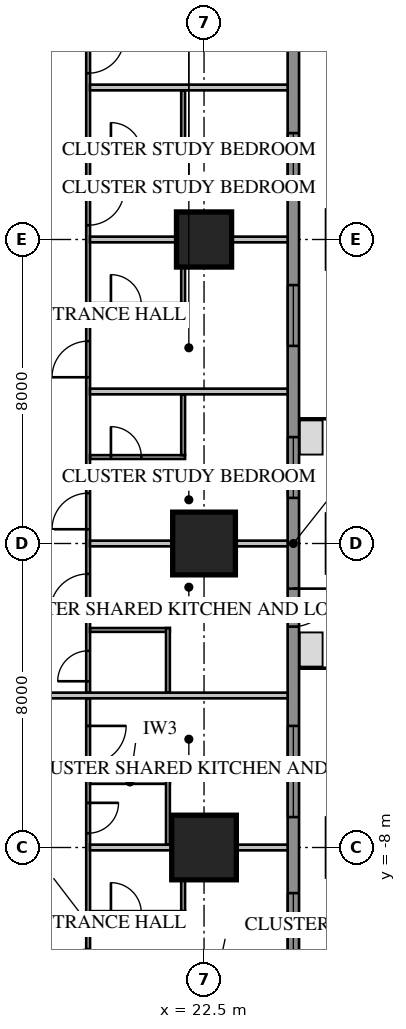
"""IFC4 building model, lengths in metres.
Left out: names, types, materials, properties, quantities, classifications, styles, units other than length and angle.
Written with IfcOpenShell. Run it as: python <this file> out.ifc"""

import sys

from ifc_helpers import new_model, si_unit, direction, frame, frame_2d, origin, origin_2d, place, context, subcontext, project, spatial, rectangle, extrude, element, fill, save


model = new_model("IFC4")
c1 = context("Model", 3, precision=1e-05, world=origin(), true_north=direction((0.0, 1.0)))
c2 = subcontext(c1, "Body", "Model", "MODEL_VIEW")
j1 = project(units=[si_unit("LENGTHUNIT", "METRE"), si_unit("PLANEANGLEUNIT", "RADIAN")], contexts=[c1])
p1 = place(None, origin())
s1 = spatial("IfcSite", under=j1, at=p1, CompositionType="ELEMENT")
p2 = place(p1, origin())
s2 = spatial("IfcBuilding", under=s1, at=p2, CompositionType="ELEMENT")
p3 = place(p2, frame((0.0, 0.0, 42.95)))
s3 = spatial("IfcBuildingStorey", under=s2, at=p3, CompositionType="ELEMENT", Elevation=42.95)
p4 = place(p3, frame((22.5, -8.0, 0.0), z_axis=(0.0, 0.0, 1.0), x_axis=(1.0, 0.0, 0.0)))
e1 = element("IfcColumn", 1, at=p4, inside=s3, PredefinedType="COLUMN", context=c2, shape_type="SweptSolid", body=[
    extrude(rectangle(XDim=1.7, YDim=1.7, at=origin_2d()), origin(), (0.0, 0.0, 1.0), 3.85),
])
p5 = place(p3, frame((22.5, 0.0, 0.0), z_axis=(0.0, 0.0, 1.0), x_axis=(1.0, 0.0, 0.0)))
e2 = element("IfcColumn", 2, at=p5, inside=s3, PredefinedType="COLUMN", context=c2, shape_type="SweptSolid", body=[
    extrude(rectangle(XDim=1.65, YDim=1.65, at=origin_2d()), origin(), (0.0, 0.0, 1.0), 3.85),
])
p6 = place(p3, frame((22.5, 8.0, 0.0), z_axis=(0.0, 0.0, 1.0), x_axis=(1.0, 0.0, 0.0)))
e3 = element("IfcColumn", 3, at=p6, inside=s3, PredefinedType="COLUMN", context=c2, shape_type="SweptSolid", body=[
    extrude(rectangle(XDim=1.45, YDim=1.45, at=origin_2d()), origin(), (0.0, 0.0, 1.0), 3.85),
])
p7 = place(p3, frame((24.85, -16.0, 0.0), z_axis=(0.0, 0.0, 1.0), x_axis=(0.0, 1.0, 0.0)))
e4 = element("IfcWall", 4, at=p7, inside=s3, PredefinedType="SOLIDWALL", context=c2, shape_type="SweptSolid", body=[
    extrude(rectangle(XDim=32.0, YDim=0.3, at=frame_2d((16.0, 0.0))), origin(), (0.0, 0.0, 1.0), 3.65),
])
p8 = place(p7, frame((1.2, 0.0, 0.75)))
e5 = element("IfcOpeningElement", 5, at=p8, cuts=e4, PredefinedType="OPENING", context=c2, shape_type="SweptSolid", body=[
    extrude(rectangle(XDim=1.6, YDim=1.8, at=frame_2d((0.8, 0.9))), frame((0.0, 0.17, 0.0), z_axis=(0.0, -1.0, 0.0), x_axis=(1.0, 0.0, 0.0)), (0.0, 0.0, 1.0), 0.34),
])
p9 = place(p7, frame((5.2, 0.0, 0.75)))
e6 = element("IfcOpeningElement", 6, at=p9, cuts=e4, PredefinedType="OPENING", context=c2, shape_type="SweptSolid", body=[
    extrude(rectangle(XDim=1.6, YDim=1.8, at=frame_2d((0.8, 0.9))), frame((0.0, 0.17, 0.0), z_axis=(0.0, -1.0, 0.0), x_axis=(1.0, 0.0, 0.0)), (0.0, 0.0, 1.0), 0.34),
])
p10 = place(p7, frame((17.2, 0.0, 0.75)))
e7 = element("IfcOpeningElement", 7, at=p10, cuts=e4, PredefinedType="OPENING", context=c2, shape_type="SweptSolid", body=[
    extrude(rectangle(XDim=1.6, YDim=1.8, at=frame_2d((0.8, 0.9))), frame((0.0, 0.17, 0.0), z_axis=(0.0, -1.0, 0.0), x_axis=(1.0, 0.0, 0.0)), (0.0, 0.0, 1.0), 0.34),
])
p11 = place(p7, frame((21.2, 0.0, 0.75)))
e8 = element("IfcOpeningElement", 8, at=p11, cuts=e4, PredefinedType="OPENING", context=c2, shape_type="SweptSolid", body=[
    extrude(rectangle(XDim=1.6, YDim=1.8, at=frame_2d((0.8, 0.9))), frame((0.0, 0.17, 0.0), z_axis=(0.0, -1.0, 0.0), x_axis=(1.0, 0.0, 0.0)), (0.0, 0.0, 1.0), 0.34),
])
p12 = place(p7, frame((25.2, 0.0, 0.75)))
e9 = element("IfcOpeningElement", 9, at=p12, cuts=e4, PredefinedType="OPENING", context=c2, shape_type="SweptSolid", body=[
    extrude(rectangle(XDim=1.6, YDim=1.8, at=frame_2d((0.8, 0.9))), frame((0.0, 0.17, 0.0), z_axis=(0.0, -1.0, 0.0), x_axis=(1.0, 0.0, 0.0)), (0.0, 0.0, 1.0), 0.34),
])
p13 = place(p7, frame((29.2, 0.0, 0.75)))
e10 = element("IfcOpeningElement", 10, at=p13, cuts=e4, PredefinedType="OPENING", context=c2, shape_type="SweptSolid", body=[
    extrude(rectangle(XDim=1.6, YDim=1.8, at=frame_2d((0.8, 0.9))), frame((0.0, 0.17, 0.0), z_axis=(0.0, -1.0, 0.0), x_axis=(1.0, 0.0, 0.0)), (0.0, 0.0, 1.0), 0.34),
])
p14 = place(p7, frame((8.8, 0.0, 0.75)))
e11 = element("IfcOpeningElement", 11, at=p14, cuts=e4, PredefinedType="OPENING", context=c2, shape_type="SweptSolid", body=[
    extrude(rectangle(XDim=2.4, YDim=1.8, at=frame_2d((1.2, 0.9))), frame((0.0, 0.17, 0.0), z_axis=(0.0, -1.0, 0.0), x_axis=(1.0, 0.0, 0.0)), (0.0, 0.0, 1.0), 0.34),
])
p15 = place(p7, frame((13.812, 0.0, 0.0)))
e12 = element("IfcOpeningElement", 12, at=p15, cuts=e4, PredefinedType="OPENING", context=c2, shape_type="SweptSolid", body=[
    extrude(rectangle(XDim=1.0, YDim=2.4, at=frame_2d((0.5, 1.2))), frame((0.0, 0.17, 0.0), z_axis=(0.0, -1.0, 0.0), x_axis=(1.0, 0.0, 0.0)), (0.0, 0.0, 1.0), 0.34),
])
p16 = place(p3, frame((19.45, -15.925, 0.0), z_axis=(0.0, 0.0, 1.0), x_axis=(0.0, 1.0, 0.0)))
e13 = element("IfcWall", 13, at=p16, inside=s3, PredefinedType="PARTITIONING", context=c2, shape_type="SweptSolid", body=[
    extrude(rectangle(XDim=11.85, YDim=0.1, at=frame_2d((5.925, 0.0))), origin(), (0.0, 0.0, 1.0), 3.65),
])
p17 = place(p16, frame((10.125, 0.0, 0.0)))
e14 = element("IfcOpeningElement", 14, at=p17, cuts=e13, PredefinedType="OPENING", context=c2, shape_type="SweptSolid", body=[
    extrude(rectangle(XDim=1.0, YDim=2.1, at=frame_2d((0.5, 1.05))), frame((0.0, 0.07, 0.0), z_axis=(0.0, -1.0, 0.0), x_axis=(1.0, 0.0, 0.0)), (0.0, 0.0, 1.0), 0.14),
])
p18 = place(p16, frame((8.3, 0.0, 0.0)))
e15 = element("IfcOpeningElement", 15, at=p18, cuts=e13, PredefinedType="OPENING", context=c2, shape_type="SweptSolid", body=[
    extrude(rectangle(XDim=0.8, YDim=2.1, at=frame_2d((0.4, 1.05))), frame((0.0, 0.07, 0.0), z_axis=(0.0, -1.0, 0.0), x_axis=(1.0, 0.0, 0.0)), (0.0, 0.0, 1.0), 0.14),
])
p19 = place(p16, frame((0.3, 0.0, 0.0)))
e16 = element("IfcOpeningElement", 16, at=p19, cuts=e13, PredefinedType="OPENING", context=c2, shape_type="SweptSolid", body=[
    extrude(rectangle(XDim=0.95, YDim=2.1, at=frame_2d((0.475, 1.05))), frame((0.0, 0.07, 0.0), z_axis=(0.0, -1.0, 0.0), x_axis=(1.0, 0.0, 0.0)), (0.0, 0.0, 1.0), 0.14),
])
p20 = place(p16, frame((4.3, 0.0, 0.0)))
e17 = element("IfcOpeningElement", 17, at=p20, cuts=e13, PredefinedType="OPENING", context=c2, shape_type="SweptSolid", body=[
    extrude(rectangle(XDim=0.95, YDim=2.1, at=frame_2d((0.475, 1.05))), frame((0.0, 0.07, 0.0), z_axis=(0.0, -1.0, 0.0), x_axis=(1.0, 0.0, 0.0)), (0.0, 0.0, 1.0), 0.14),
])
p21 = place(p3, frame((19.5, -6.275, 0.0), z_axis=(0.0, 0.0, 1.0), x_axis=(1.0, 0.0, 0.0)))
e18 = element("IfcWall", 18, at=p21, inside=s3, PredefinedType="PARTITIONING", context=c2, shape_type="SweptSolid", body=[
    extrude(rectangle(XDim=2.1, YDim=0.1, at=frame_2d((1.05, 0.0))), origin(), (0.0, 0.0, 1.0), 3.65),
])
p22 = place(p3, frame((21.55, -7.925, 0.0), z_axis=(0.0, 0.0, 1.0), x_axis=(0.0, 1.0, 0.0)))
e19 = element("IfcWall", 19, at=p22, inside=s3, PredefinedType="PARTITIONING", context=c2, shape_type="SweptSolid", body=[
    extrude(rectangle(XDim=1.7, YDim=0.1, at=frame_2d((0.85, 0.0))), origin(), (0.0, 0.0, 1.0), 3.65),
])
p23 = place(p3, frame((19.45, -3.925, 0.0), z_axis=(0.0, 0.0, 1.0), x_axis=(0.0, 1.0, 0.0)))
e20 = element("IfcWall", 20, at=p23, inside=s3, PredefinedType="PARTITIONING", context=c2, shape_type="SweptSolid", body=[
    extrude(rectangle(XDim=19.85, YDim=0.1, at=frame_2d((9.925, 0.0))), origin(), (0.0, 0.0, 1.0), 3.65),
])
p24 = place(p23, frame((2.125, 0.0, 0.0)))
e21 = element("IfcOpeningElement", 21, at=p24, cuts=e20, PredefinedType="OPENING", context=c2, shape_type="SweptSolid", body=[
    extrude(rectangle(XDim=1.0, YDim=2.1, at=frame_2d((0.5, 1.05))), frame((0.0, 0.07, 0.0), z_axis=(0.0, -1.0, 0.0), x_axis=(1.0, 0.0, 0.0)), (0.0, 0.0, 1.0), 0.14),
])
p25 = place(p23, frame((0.3, 0.0, 0.0)))
e22 = element("IfcOpeningElement", 22, at=p25, cuts=e20, PredefinedType="OPENING", context=c2, shape_type="SweptSolid", body=[
    extrude(rectangle(XDim=0.8, YDim=2.1, at=frame_2d((0.4, 1.05))), frame((0.0, 0.07, 0.0), z_axis=(0.0, -1.0, 0.0), x_axis=(1.0, 0.0, 0.0)), (0.0, 0.0, 1.0), 0.14),
])
p26 = place(p23, frame((4.3, 0.0, 0.0)))
e23 = element("IfcOpeningElement", 23, at=p26, cuts=e20, PredefinedType="OPENING", context=c2, shape_type="SweptSolid", body=[
    extrude(rectangle(XDim=0.95, YDim=2.1, at=frame_2d((0.475, 1.05))), frame((0.0, 0.07, 0.0), z_axis=(0.0, -1.0, 0.0), x_axis=(1.0, 0.0, 0.0)), (0.0, 0.0, 1.0), 0.14),
])
p27 = place(p23, frame((8.3, 0.0, 0.0)))
e24 = element("IfcOpeningElement", 24, at=p27, cuts=e20, PredefinedType="OPENING", context=c2, shape_type="SweptSolid", body=[
    extrude(rectangle(XDim=0.95, YDim=2.1, at=frame_2d((0.475, 1.05))), frame((0.0, 0.07, 0.0), z_axis=(0.0, -1.0, 0.0), x_axis=(1.0, 0.0, 0.0)), (0.0, 0.0, 1.0), 0.14),
])
p28 = place(p23, frame((12.3, 0.0, 0.0)))
e25 = element("IfcOpeningElement", 25, at=p28, cuts=e20, PredefinedType="OPENING", context=c2, shape_type="SweptSolid", body=[
    extrude(rectangle(XDim=0.95, YDim=2.1, at=frame_2d((0.475, 1.05))), frame((0.0, 0.07, 0.0), z_axis=(0.0, -1.0, 0.0), x_axis=(1.0, 0.0, 0.0)), (0.0, 0.0, 1.0), 0.14),
])
p29 = place(p23, frame((16.3, 0.0, 0.0)))
e26 = element("IfcOpeningElement", 26, at=p29, cuts=e20, PredefinedType="OPENING", context=c2, shape_type="SweptSolid", body=[
    extrude(rectangle(XDim=0.95, YDim=2.1, at=frame_2d((0.475, 1.05))), frame((0.0, 0.07, 0.0), z_axis=(0.0, -1.0, 0.0), x_axis=(1.0, 0.0, 0.0)), (0.0, 0.0, 1.0), 0.14),
])
p30 = place(p3, frame((19.5, -2.275, 0.0), z_axis=(0.0, 0.0, 1.0), x_axis=(1.0, 0.0, 0.0)))
e27 = element("IfcWall", 27, at=p30, inside=s3, PredefinedType="PARTITIONING", context=c2, shape_type="SweptSolid", body=[
    extrude(rectangle(XDim=2.1, YDim=0.1, at=frame_2d((1.05, 0.0))), origin(), (0.0, 0.0, 1.0), 3.65),
])
p31 = place(p3, frame((21.55, -3.925, 0.0), z_axis=(0.0, 0.0, 1.0), x_axis=(0.0, 1.0, 0.0)))
e28 = element("IfcWall", 28, at=p31, inside=s3, PredefinedType="PARTITIONING", context=c2, shape_type="SweptSolid", body=[
    extrude(rectangle(XDim=1.7, YDim=0.1, at=frame_2d((0.85, 0.0))), origin(), (0.0, 0.0, 1.0), 3.65),
])
p32 = place(p3, frame((19.5, -8.0, 0.0), z_axis=(0.0, 0.0, 1.0), x_axis=(1.0, 0.0, 0.0)))
e29 = element("IfcWall", 29, at=p32, inside=s3, PredefinedType="PARTITIONING", context=c2, shape_type="SweptSolid", body=[
    extrude(rectangle(XDim=5.2, YDim=0.15, at=frame_2d((2.6, 0.0))), origin(), (0.0, 0.0, 1.0), 3.65),
])
p33 = place(p3, frame((18.1, -4.0, 0.0), z_axis=(0.0, 0.0, 1.0), x_axis=(1.0, 0.0, 0.0)))
e30 = element("IfcWall", 30, at=p33, inside=s3, PredefinedType="PARTITIONING", context=c2, shape_type="SweptSolid", body=[
    extrude(rectangle(XDim=6.6, YDim=0.15, at=frame_2d((3.3, 0.0))), origin(), (0.0, 0.0, 1.0), 3.65),
])
p34 = place(p3, frame((19.5, 0.0, 0.0), z_axis=(0.0, 0.0, 1.0), x_axis=(1.0, 0.0, 0.0)))
e31 = element("IfcWall", 31, at=p34, inside=s3, PredefinedType="PARTITIONING", context=c2, shape_type="SweptSolid", body=[
    extrude(rectangle(XDim=5.2, YDim=0.15, at=frame_2d((2.6, 0.0))), origin(), (0.0, 0.0, 1.0), 2.957),
])
for number, where, z_axis, x_axis in (
    (32, (19.5, 4.0, 0.0), (0.0, 0.0, 1.0), (1.0, 0.0, 0.0)),
    (33, (19.5, 8.0, 0.0), (0.0, 0.0, 1.0), (1.0, 0.0, 0.0)),
    (34, (19.5, 12.0, 0.0), (0.0, 0.0, 1.0), (1.0, 0.0, 0.0)),
):
    element("IfcWall", number, at=place(p3, frame(where, z_axis=z_axis, x_axis=x_axis)), inside=s3, PredefinedType="PARTITIONING", context=c2, shape_type="SweptSolid", body=[
        extrude(rectangle(XDim=5.2, YDim=0.15, at=frame_2d((2.6, 0.0))), origin(), (0.0, 0.0, 1.0), 3.65),
    ])
p35 = place(p3, frame((19.5, -9.725, 0.0), z_axis=(0.0, 0.0, 1.0), x_axis=(1.0, 0.0, 0.0)))
e35 = element("IfcWall", 35, at=p35, inside=s3, PredefinedType="PARTITIONING", context=c2, shape_type="SweptSolid", body=[
    extrude(rectangle(XDim=2.5, YDim=0.1, at=frame_2d((1.25, 0.0))), origin(), (0.0, 0.0, 1.0), 3.65),
])
p36 = place(p35, frame((0.55, 0.0, 0.0)))
e36 = element("IfcOpeningElement", 36, at=p36, cuts=e35, PredefinedType="OPENING", context=c2, shape_type="SweptSolid", body=[
    extrude(rectangle(XDim=0.8, YDim=2.1, at=frame_2d((0.4, 1.05))), frame((0.0, 0.07, 0.0), z_axis=(0.0, -1.0, 0.0), x_axis=(1.0, 0.0, 0.0)), (0.0, 0.0, 1.0), 0.14),
])
p37 = place(p3, frame((21.95, -9.675, 0.0), z_axis=(0.0, 0.0, 1.0), x_axis=(0.0, 1.0, 0.0)))
e37 = element("IfcWall", 37, at=p37, inside=s3, PredefinedType="PARTITIONING", context=c2, shape_type="SweptSolid", body=[
    extrude(rectangle(XDim=1.6, YDim=0.1, at=frame_2d((0.8, 0.0))), origin(), (0.0, 0.0, 1.0), 3.65),
])
p38 = place(p3, frame((19.5, 2.275, 0.0), z_axis=(0.0, 0.0, 1.0), x_axis=(1.0, 0.0, 0.0)))
e38 = element("IfcWall", 38, at=p38, inside=s3, PredefinedType="PARTITIONING", context=c2, shape_type="SweptSolid", body=[
    extrude(rectangle(XDim=2.5, YDim=0.1, at=frame_2d((1.25, 0.0))), origin(), (0.0, 0.0, 1.0), 3.65),
])
p39 = place(p38, frame((0.55, 0.0, 0.0)))
e39 = element("IfcOpeningElement", 39, at=p39, cuts=e38, PredefinedType="OPENING", context=c2, shape_type="SweptSolid", body=[
    extrude(rectangle(XDim=0.8, YDim=2.1, at=frame_2d((0.4, 1.05))), frame((0.0, 0.07, 0.0), z_axis=(0.0, -1.0, 0.0), x_axis=(1.0, 0.0, 0.0)), (0.0, 0.0, 1.0), 0.14),
])
p40 = place(p3, frame((21.95, 2.325, 0.0), z_axis=(0.0, 0.0, 1.0), x_axis=(0.0, 1.0, 0.0)))
e40 = element("IfcWall", 40, at=p40, inside=s3, PredefinedType="PARTITIONING", context=c2, shape_type="SweptSolid", body=[
    extrude(rectangle(XDim=1.6, YDim=0.1, at=frame_2d((0.8, 0.0))), origin(), (0.0, 0.0, 1.0), 3.65),
])
p41 = place(p3, frame((19.5, 6.275, 0.0), z_axis=(0.0, 0.0, 1.0), x_axis=(1.0, 0.0, 0.0)))
e41 = element("IfcWall", 41, at=p41, inside=s3, PredefinedType="PARTITIONING", context=c2, shape_type="SweptSolid", body=[
    extrude(rectangle(XDim=2.5, YDim=0.1, at=frame_2d((1.25, 0.0))), origin(), (0.0, 0.0, 1.0), 3.65),
])
p42 = place(p41, frame((0.55, 0.0, 0.0)))
e42 = element("IfcOpeningElement", 42, at=p42, cuts=e41, PredefinedType="OPENING", context=c2, shape_type="SweptSolid", body=[
    extrude(rectangle(XDim=0.8, YDim=2.1, at=frame_2d((0.4, 1.05))), frame((0.0, 0.07, 0.0), z_axis=(0.0, -1.0, 0.0), x_axis=(1.0, 0.0, 0.0)), (0.0, 0.0, 1.0), 0.14),
])
p43 = place(p3, frame((21.95, 6.325, 0.0), z_axis=(0.0, 0.0, 1.0), x_axis=(0.0, 1.0, 0.0)))
e43 = element("IfcWall", 43, at=p43, inside=s3, PredefinedType="PARTITIONING", context=c2, shape_type="SweptSolid", body=[
    extrude(rectangle(XDim=1.6, YDim=0.1, at=frame_2d((0.8, 0.0))), origin(), (0.0, 0.0, 1.0), 3.65),
])
p44 = place(p3, frame((19.5, 10.275, 0.0), z_axis=(0.0, 0.0, 1.0), x_axis=(1.0, 0.0, 0.0)))
e44 = element("IfcWall", 44, at=p44, inside=s3, PredefinedType="PARTITIONING", context=c2, shape_type="SweptSolid", body=[
    extrude(rectangle(XDim=2.5, YDim=0.1, at=frame_2d((1.25, 0.0))), origin(), (0.0, 0.0, 1.0), 3.65),
])
p45 = place(p44, frame((0.55, 0.0, 0.0)))
e45 = element("IfcOpeningElement", 45, at=p45, cuts=e44, PredefinedType="OPENING", context=c2, shape_type="SweptSolid", body=[
    extrude(rectangle(XDim=0.8, YDim=2.1, at=frame_2d((0.4, 1.05))), frame((0.0, 0.07, 0.0), z_axis=(0.0, -1.0, 0.0), x_axis=(1.0, 0.0, 0.0)), (0.0, 0.0, 1.0), 0.14),
])
p46 = place(p3, frame((21.95, 10.325, 0.0), z_axis=(0.0, 0.0, 1.0), x_axis=(0.0, 1.0, 0.0)))
e46 = element("IfcWall", 46, at=p46, inside=s3, PredefinedType="PARTITIONING", context=c2, shape_type="SweptSolid", body=[
    extrude(rectangle(XDim=1.6, YDim=0.1, at=frame_2d((0.8, 0.0))), origin(), (0.0, 0.0, 1.0), 3.65),
])
p47 = place(p9, origin())
e47 = element("IfcWindow", 47, at=p47, inside=s3, PartitioningType="SINGLE_PANEL", PredefinedType="WINDOW", context=c2, shape_type="SweptSolid", body=[
    extrude(rectangle(XDim=1.6, YDim=1.8, at=frame_2d((0.8, 0.9))), frame((0.0, 0.03, 0.0), z_axis=(0.0, -1.0, 0.0), x_axis=(1.0, 0.0, 0.0)), (0.0, 0.0, 1.0), 0.06),
])
fill(e6, e47)
p48 = place(p10, origin())
e48 = element("IfcWindow", 48, at=p48, inside=s3, PartitioningType="SINGLE_PANEL", PredefinedType="WINDOW", context=c2, shape_type="SweptSolid", body=[
    extrude(rectangle(XDim=1.6, YDim=1.8, at=frame_2d((0.8, 0.9))), frame((0.0, 0.03, 0.0), z_axis=(0.0, -1.0, 0.0), x_axis=(1.0, 0.0, 0.0)), (0.0, 0.0, 1.0), 0.06),
])
fill(e7, e48)
p49 = place(p11, origin())
e49 = element("IfcWindow", 49, at=p49, inside=s3, PartitioningType="SINGLE_PANEL", PredefinedType="WINDOW", context=c2, shape_type="SweptSolid", body=[
    extrude(rectangle(XDim=1.6, YDim=1.8, at=frame_2d((0.8, 0.9))), frame((0.0, 0.03, 0.0), z_axis=(0.0, -1.0, 0.0), x_axis=(1.0, 0.0, 0.0)), (0.0, 0.0, 1.0), 0.06),
])
fill(e8, e49)
p50 = place(p12, origin())
e50 = element("IfcWindow", 50, at=p50, inside=s3, PartitioningType="SINGLE_PANEL", PredefinedType="WINDOW", context=c2, shape_type="SweptSolid", body=[
    extrude(rectangle(XDim=1.6, YDim=1.8, at=frame_2d((0.8, 0.9))), frame((0.0, 0.03, 0.0), z_axis=(0.0, -1.0, 0.0), x_axis=(1.0, 0.0, 0.0)), (0.0, 0.0, 1.0), 0.06),
])
fill(e9, e50)
p51 = place(p14, origin())
e51 = element("IfcWindow", 51, at=p51, inside=s3, PartitioningType="SINGLE_PANEL", PredefinedType="WINDOW", context=c2, shape_type="SweptSolid", body=[
    extrude(rectangle(XDim=2.4, YDim=1.8, at=frame_2d((1.2, 0.9))), frame((0.0, 0.03, 0.0), z_axis=(0.0, -1.0, 0.0), x_axis=(1.0, 0.0, 0.0)), (0.0, 0.0, 1.0), 0.06),
])
fill(e11, e51)
p52 = place(p15, origin())
e52 = element("IfcDoor", 52, at=p52, inside=s3, OperationType="SINGLE_SWING_RIGHT", PredefinedType="DOOR", context=c2, shape_type="SweptSolid", body=[
    extrude(rectangle(XDim=1.0, YDim=2.4, at=frame_2d((0.5, 1.2))), frame((0.0, 0.025, 0.0), z_axis=(0.0, -1.0, 0.0), x_axis=(1.0, 0.0, 0.0)), (0.0, 0.0, 1.0), 0.05),
])
fill(e12, e52)
p53 = place(p17, origin())
e53 = element("IfcDoor", 53, at=p53, inside=s3, OperationType="SINGLE_SWING_RIGHT", PredefinedType="DOOR", context=c2, shape_type="SweptSolid", body=[
    extrude(rectangle(XDim=1.0, YDim=2.1, at=frame_2d((0.5, 1.05))), frame((0.0, 0.025, 0.0), z_axis=(0.0, -1.0, 0.0), x_axis=(1.0, 0.0, 0.0)), (0.0, 0.0, 1.0), 0.05),
])
fill(e14, e53)
p54 = place(p18, origin())
e54 = element("IfcDoor", 54, at=p54, inside=s3, OperationType="SINGLE_SWING_RIGHT", PredefinedType="DOOR", context=c2, shape_type="SweptSolid", body=[
    extrude(rectangle(XDim=0.8, YDim=2.1, at=frame_2d((0.4, 1.05))), frame((0.0, 0.025, 0.0), z_axis=(0.0, -1.0, 0.0), x_axis=(1.0, 0.0, 0.0)), (0.0, 0.0, 1.0), 0.05),
])
fill(e15, e54)
p55 = place(p24, origin())
e55 = element("IfcDoor", 55, at=p55, inside=s3, OperationType="SINGLE_SWING_LEFT", PredefinedType="DOOR", context=c2, shape_type="SweptSolid", body=[
    extrude(rectangle(XDim=1.0, YDim=2.1, at=frame_2d((0.5, 1.05))), frame((0.0, 0.025, 0.0), z_axis=(0.0, -1.0, 0.0), x_axis=(1.0, 0.0, 0.0)), (0.0, 0.0, 1.0), 0.05),
])
fill(e21, e55)
p56 = place(p25, origin())
e56 = element("IfcDoor", 56, at=p56, inside=s3, OperationType="SINGLE_SWING_LEFT", PredefinedType="DOOR", context=c2, shape_type="SweptSolid", body=[
    extrude(rectangle(XDim=0.8, YDim=2.1, at=frame_2d((0.4, 1.05))), frame((0.0, 0.025, 0.0), z_axis=(0.0, -1.0, 0.0), x_axis=(1.0, 0.0, 0.0)), (0.0, 0.0, 1.0), 0.05),
])
fill(e22, e56)
p57 = place(p20, origin())
e57 = element("IfcDoor", 57, at=p57, inside=s3, OperationType="SINGLE_SWING_LEFT", PredefinedType="DOOR", context=c2, shape_type="SweptSolid", body=[
    extrude(rectangle(XDim=0.95, YDim=2.1, at=frame_2d((0.475, 1.05))), frame((0.0, 0.025, 0.0), z_axis=(0.0, -1.0, 0.0), x_axis=(1.0, 0.0, 0.0)), (0.0, 0.0, 1.0), 0.05),
])
fill(e17, e57)
p58 = place(p36, origin())
e58 = element("IfcDoor", 58, at=p58, inside=s3, OperationType="SINGLE_SWING_LEFT", PredefinedType="DOOR", context=c2, shape_type="SweptSolid", body=[
    extrude(rectangle(XDim=0.8, YDim=2.1, at=frame_2d((0.4, 1.05))), frame((0.0, 0.025, 0.0), z_axis=(0.0, -1.0, 0.0), x_axis=(1.0, 0.0, 0.0)), (0.0, 0.0, 1.0), 0.05),
])
fill(e36, e58)
p59 = place(p26, origin())
e59 = element("IfcDoor", 59, at=p59, inside=s3, OperationType="SINGLE_SWING_LEFT", PredefinedType="DOOR", context=c2, shape_type="SweptSolid", body=[
    extrude(rectangle(XDim=0.95, YDim=2.1, at=frame_2d((0.475, 1.05))), frame((0.0, 0.025, 0.0), z_axis=(0.0, -1.0, 0.0), x_axis=(1.0, 0.0, 0.0)), (0.0, 0.0, 1.0), 0.05),
])
fill(e23, e59)
p60 = place(p39, origin())
e60 = element("IfcDoor", 60, at=p60, inside=s3, OperationType="SINGLE_SWING_LEFT", PredefinedType="DOOR", context=c2, shape_type="SweptSolid", body=[
    extrude(rectangle(XDim=0.8, YDim=2.1, at=frame_2d((0.4, 1.05))), frame((0.0, 0.025, 0.0), z_axis=(0.0, -1.0, 0.0), x_axis=(1.0, 0.0, 0.0)), (0.0, 0.0, 1.0), 0.05),
])
fill(e39, e60)
p61 = place(p27, origin())
e61 = element("IfcDoor", 61, at=p61, inside=s3, OperationType="SINGLE_SWING_LEFT", PredefinedType="DOOR", context=c2, shape_type="SweptSolid", body=[
    extrude(rectangle(XDim=0.95, YDim=2.1, at=frame_2d((0.475, 1.05))), frame((0.0, 0.025, 0.0), z_axis=(0.0, -1.0, 0.0), x_axis=(1.0, 0.0, 0.0)), (0.0, 0.0, 1.0), 0.05),
])
fill(e24, e61)
p62 = place(p42, origin())
e62 = element("IfcDoor", 62, at=p62, inside=s3, OperationType="SINGLE_SWING_LEFT", PredefinedType="DOOR", context=c2, shape_type="SweptSolid", body=[
    extrude(rectangle(XDim=0.8, YDim=2.1, at=frame_2d((0.4, 1.05))), frame((0.0, 0.025, 0.0), z_axis=(0.0, -1.0, 0.0), x_axis=(1.0, 0.0, 0.0)), (0.0, 0.0, 1.0), 0.05),
])
fill(e42, e62)
p63 = place(p28, origin())
e63 = element("IfcDoor", 63, at=p63, inside=s3, OperationType="SINGLE_SWING_RIGHT", PredefinedType="DOOR", context=c2, shape_type="SweptSolid", body=[
    extrude(rectangle(XDim=0.95, YDim=2.1, at=frame_2d((0.475, 1.05))), frame((0.0, 0.025, 0.0), z_axis=(0.0, -1.0, 0.0), x_axis=(1.0, 0.0, 0.0)), (0.0, 0.0, 1.0), 0.05),
])
fill(e25, e63)
p64 = place(p45, origin())
e64 = element("IfcDoor", 64, at=p64, inside=s3, OperationType="SINGLE_SWING_LEFT", PredefinedType="DOOR", context=c2, shape_type="SweptSolid", body=[
    extrude(rectangle(XDim=0.8, YDim=2.1, at=frame_2d((0.4, 1.05))), frame((0.0, 0.025, 0.0), z_axis=(0.0, -1.0, 0.0), x_axis=(1.0, 0.0, 0.0)), (0.0, 0.0, 1.0), 0.05),
])
fill(e45, e64)
p65 = place(p29, origin())
e65 = element("IfcDoor", 65, at=p65, inside=s3, OperationType="SINGLE_SWING_RIGHT", PredefinedType="DOOR", context=c2, shape_type="SweptSolid", body=[
    extrude(rectangle(XDim=0.95, YDim=2.1, at=frame_2d((0.475, 1.05))), frame((0.0, 0.025, 0.0), z_axis=(0.0, -1.0, 0.0), x_axis=(1.0, 0.0, 0.0)), (0.0, 0.0, 1.0), 0.05),
])
fill(e26, e65)
save(model, sys.argv[1])
